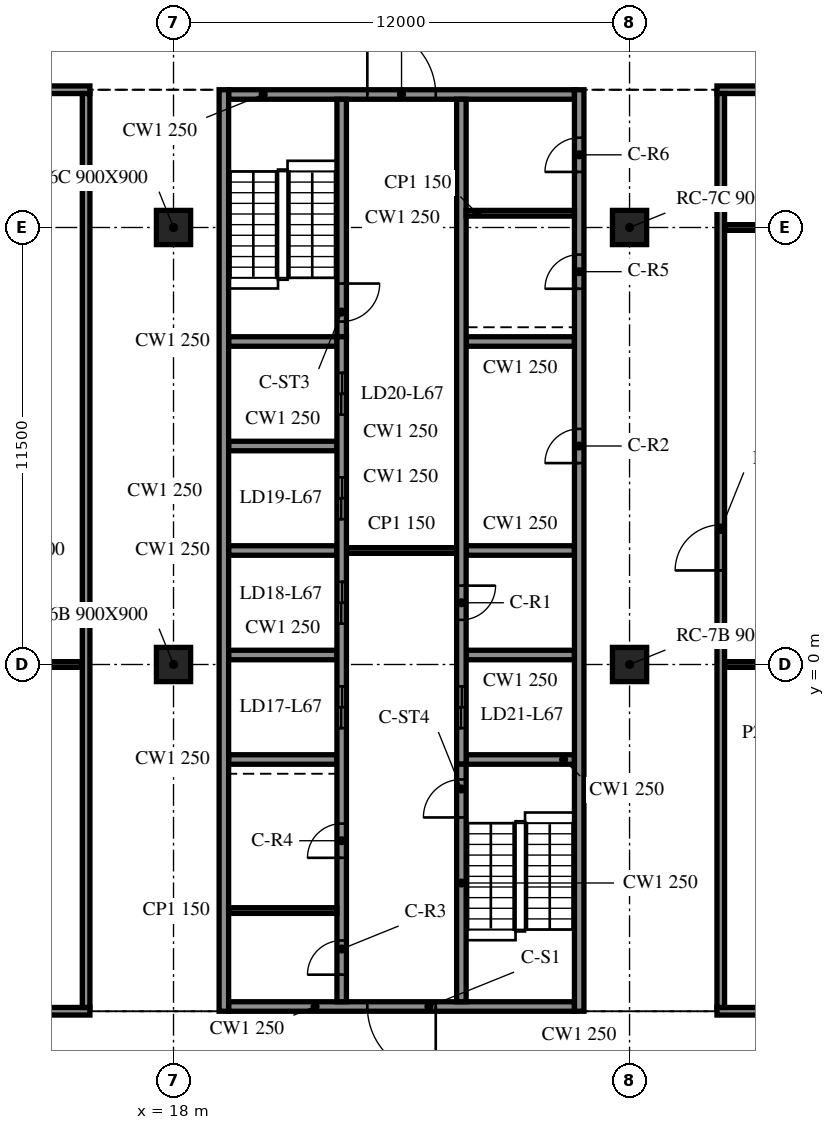
"""IFC4 building model, lengths in metres.
Left out: names, types, materials, properties, quantities, classifications, styles, units other than length and angle.
Written with IfcOpenShell. Run it as: python <this file> out.ifc"""

import sys

from ifc_helpers import new_model, si_unit, direction, frame, frame_2d, origin, origin_2d, place, context, subcontext, project, spatial, rectangle, extrude, element, fill, save


model = new_model("IFC4")
c1 = context("Model", 3, precision=1e-05, world=origin(), true_north=direction((0.0, 1.0)))
c2 = subcontext(c1, "Body", "Model", "MODEL_VIEW")
j1 = project(units=[si_unit("LENGTHUNIT", "METRE"), si_unit("PLANEANGLEUNIT", "RADIAN")], contexts=[c1])
p1 = place(None, origin())
s1 = spatial("IfcSite", under=j1, at=p1, CompositionType="ELEMENT")
p2 = place(p1, origin())
s2 = spatial("IfcBuilding", under=s1, at=p2, CompositionType="ELEMENT")
p3 = place(p2, frame((0.0, 0.0, 274.7)))
s3 = spatial("IfcBuildingStorey", under=s2, at=p3, CompositionType="ELEMENT", Elevation=274.7)
for number, where, z_axis, x_axis in (
    (1, (18.0, 0.0, -0.34), (0.0, 0.0, 1.0), (1.0, 0.0, 0.0)),
    (2, (18.0, 11.5, -0.34), (0.0, 0.0, 1.0), (1.0, 0.0, 0.0)),
    (3, (30.0, 0.0, -0.34), (0.0, 0.0, 1.0), (1.0, 0.0, 0.0)),
    (4, (30.0, 11.5, -0.34), (0.0, 0.0, 1.0), (1.0, 0.0, 0.0)),
):
    element("IfcColumn", number, at=place(p3, frame(where, z_axis=z_axis, x_axis=x_axis)), inside=s3, PredefinedType="COLUMN", context=c2, shape_type="SweptSolid", body=[
        extrude(rectangle(XDim=0.9, YDim=0.9, at=origin_2d()), origin(), (0.0, 0.0, 1.0), 3.8),
    ])
p4 = place(p3, frame((19.325, 15.125, 0.0), z_axis=(0.0, 0.0, 1.0), x_axis=(0.0, -1.0, 0.0)))
e5 = element("IfcWall", 5, at=p4, inside=s3, PredefinedType="SOLIDWALL", context=c2, shape_type="SweptSolid", body=[
    extrude(rectangle(XDim=24.25, YDim=0.25, at=frame_2d((12.125, 0.0))), origin(), (0.0, 0.0, 1.0), 3.46),
])
p5 = place(p3, frame((28.675, -9.125, 0.0), z_axis=(0.0, 0.0, 1.0), x_axis=(0.0, 1.0, 0.0)))
e6 = element("IfcWall", 6, at=p5, inside=s3, PredefinedType="SOLIDWALL", context=c2, shape_type="SweptSolid", body=[
    extrude(rectangle(XDim=24.25, YDim=0.25, at=frame_2d((12.125, 0.0))), origin(), (0.0, 0.0, 1.0), 3.46),
])
p6 = place(p5, frame((14.425, 0.0, 0.0)))
e7 = element("IfcOpeningElement", 7, at=p6, cuts=e6, PredefinedType="OPENING", context=c2, shape_type="SweptSolid", body=[
    extrude(rectangle(XDim=0.9, YDim=2.1, at=frame_2d((0.45, 1.05))), frame((0.0, 0.135, 0.0), z_axis=(0.0, -1.0, 0.0), x_axis=(1.0, 0.0, 0.0)), (0.0, 0.0, 1.0), 0.27),
])
p7 = place(p5, frame((19.012, 0.0, 0.0)))
e8 = element("IfcOpeningElement", 8, at=p7, cuts=e6, PredefinedType="OPENING", context=c2, shape_type="SweptSolid", body=[
    extrude(rectangle(XDim=0.9, YDim=2.1, at=frame_2d((0.45, 1.05))), frame((0.0, 0.135, 0.0), z_axis=(0.0, -1.0, 0.0), x_axis=(1.0, 0.0, 0.0)), (0.0, 0.0, 1.0), 0.27),
])
p8 = place(p5, frame((22.087, 0.0, 0.0)))
e9 = element("IfcOpeningElement", 9, at=p8, cuts=e6, PredefinedType="OPENING", context=c2, shape_type="SweptSolid", body=[
    extrude(rectangle(XDim=0.9, YDim=2.1, at=frame_2d((0.45, 1.05))), frame((0.0, 0.135, 0.0), z_axis=(0.0, -1.0, 0.0), x_axis=(1.0, 0.0, 0.0)), (0.0, 0.0, 1.0), 0.27),
])
p9 = place(p3, frame((28.55, -9.0, 0.0), z_axis=(0.0, 0.0, 1.0), x_axis=(-1.0, 0.0, 0.0)))
e10 = element("IfcWall", 10, at=p9, inside=s3, PredefinedType="SOLIDWALL", context=c2, shape_type="SweptSolid", body=[
    extrude(rectangle(XDim=9.1, YDim=0.25, at=frame_2d((4.55, 0.0))), origin(), (0.0, 0.0, 1.0), 3.46),
])
p10 = place(p9, frame((3.65, 0.0, 0.0)))
e11 = element("IfcOpeningElement", 11, at=p10, cuts=e10, PredefinedType="OPENING", context=c2, shape_type="SweptSolid", body=[
    extrude(rectangle(XDim=1.8, YDim=2.1, at=frame_2d((0.9, 1.05))), frame((0.0, 0.135, 0.0), z_axis=(0.0, -1.0, 0.0), x_axis=(1.0, 0.0, 0.0)), (0.0, 0.0, 1.0), 0.27),
])
p11 = place(p3, frame((19.45, 15.0, 0.0), z_axis=(0.0, 0.0, 1.0), x_axis=(1.0, 0.0, 0.0)))
e12 = element("IfcWall", 12, at=p11, inside=s3, PredefinedType="SOLIDWALL", context=c2, shape_type="SweptSolid", body=[
    extrude(rectangle(XDim=9.1, YDim=0.25, at=frame_2d((4.55, 0.0))), origin(), (0.0, 0.0, 1.0), 3.46),
])
p12 = place(p11, frame((3.65, 0.0, 0.0)))
e13 = element("IfcOpeningElement", 13, at=p12, cuts=e12, PredefinedType="OPENING", context=c2, shape_type="SweptSolid", body=[
    extrude(rectangle(XDim=1.8, YDim=2.1, at=frame_2d((0.9, 1.05))), frame((0.0, 0.135, 0.0), z_axis=(0.0, -1.0, 0.0), x_axis=(1.0, 0.0, 0.0)), (0.0, 0.0, 1.0), 0.27),
])
p13 = place(p3, frame((22.425, -8.875, 0.0), z_axis=(0.0, 0.0, 1.0), x_axis=(0.0, 1.0, 0.0)))
e14 = element("IfcWall", 14, at=p13, inside=s3, PredefinedType="SOLIDWALL", context=c2, shape_type="SweptSolid", body=[
    extrude(rectangle(XDim=17.5, YDim=0.25, at=frame_2d((8.75, 0.0))), origin(), (0.0, 0.0, 1.0), 3.46),
])
p14 = place(p13, frame((7.2, 0.0, 0.0)))
e15 = element("IfcOpeningElement", 15, at=p14, cuts=e14, PredefinedType="OPENING", context=c2, shape_type="SweptSolid", body=[
    extrude(rectangle(XDim=1.1, YDim=2.1, at=frame_2d((0.55, 1.05))), frame((0.0, 0.135, 0.0), z_axis=(0.0, -1.0, 0.0), x_axis=(1.0, 0.0, 0.0)), (0.0, 0.0, 1.0), 0.27),
])
p15 = place(p13, frame((9.95, 0.0, 0.0)))
e16 = element("IfcOpeningElement", 16, at=p15, cuts=e14, PredefinedType="OPENING", context=c2, shape_type="SweptSolid", body=[
    extrude(rectangle(XDim=1.1, YDim=2.1, at=frame_2d((0.55, 1.05))), frame((0.0, 0.135, 0.0), z_axis=(0.0, -1.0, 0.0), x_axis=(1.0, 0.0, 0.0)), (0.0, 0.0, 1.0), 0.27),
])
p16 = place(p13, frame((12.7, 0.0, 0.0)))
e17 = element("IfcOpeningElement", 17, at=p16, cuts=e14, PredefinedType="OPENING", context=c2, shape_type="SweptSolid", body=[
    extrude(rectangle(XDim=1.1, YDim=2.1, at=frame_2d((0.55, 1.05))), frame((0.0, 0.135, 0.0), z_axis=(0.0, -1.0, 0.0), x_axis=(1.0, 0.0, 0.0)), (0.0, 0.0, 1.0), 0.27),
])
p17 = place(p13, frame((15.45, 0.0, 0.0)))
e18 = element("IfcOpeningElement", 18, at=p17, cuts=e14, PredefinedType="OPENING", context=c2, shape_type="SweptSolid", body=[
    extrude(rectangle(XDim=1.1, YDim=2.1, at=frame_2d((0.55, 1.05))), frame((0.0, 0.135, 0.0), z_axis=(0.0, -1.0, 0.0), x_axis=(1.0, 0.0, 0.0)), (0.0, 0.0, 1.0), 0.27),
])
p18 = place(p13, frame((0.712, 0.0, 0.0)))
e19 = element("IfcOpeningElement", 19, at=p18, cuts=e14, PredefinedType="OPENING", context=c2, shape_type="SweptSolid", body=[
    extrude(rectangle(XDim=0.9, YDim=2.1, at=frame_2d((0.45, 1.05))), frame((0.0, 0.135, 0.0), z_axis=(0.0, -1.0, 0.0), x_axis=(1.0, 0.0, 0.0)), (0.0, 0.0, 1.0), 0.27),
])
p19 = place(p13, frame((3.788, 0.0, 0.0)))
e20 = element("IfcOpeningElement", 20, at=p19, cuts=e14, PredefinedType="OPENING", context=c2, shape_type="SweptSolid", body=[
    extrude(rectangle(XDim=0.9, YDim=2.1, at=frame_2d((0.45, 1.05))), frame((0.0, 0.135, 0.0), z_axis=(0.0, -1.0, 0.0), x_axis=(1.0, 0.0, 0.0)), (0.0, 0.0, 1.0), 0.27),
])
p20 = place(p3, frame((22.425, 14.875, 0.0), z_axis=(0.0, 0.0, 1.0), x_axis=(0.0, -1.0, 0.0)))
e21 = element("IfcWall", 21, at=p20, inside=s3, PredefinedType="SOLIDWALL", context=c2, shape_type="SweptSolid", body=[
    extrude(rectangle(XDim=6.25, YDim=0.25, at=frame_2d((3.125, 0.0))), origin(), (0.0, 0.0, 1.0), 3.46),
])
p21 = place(p20, frame((4.85, 0.0, 0.0)))
e22 = element("IfcOpeningElement", 22, at=p21, cuts=e21, PredefinedType="OPENING", context=c2, shape_type="SweptSolid", body=[
    extrude(rectangle(XDim=1.0, YDim=2.1, at=frame_2d((0.5, 1.05))), frame((0.0, 0.135, 0.0), z_axis=(0.0, -1.0, 0.0), x_axis=(1.0, 0.0, 0.0)), (0.0, 0.0, 1.0), 0.27),
])
p22 = place(p3, frame((25.575, -8.875, 0.0), z_axis=(0.0, 0.0, 1.0), x_axis=(0.0, 1.0, 0.0)))
e23 = element("IfcWall", 23, at=p22, inside=s3, PredefinedType="SOLIDWALL", context=c2, shape_type="SweptSolid", body=[
    extrude(rectangle(XDim=6.25, YDim=0.25, at=frame_2d((3.125, 0.0))), origin(), (0.0, 0.0, 1.0), 3.46),
])
p23 = place(p22, frame((4.85, 0.0, 0.0)))
e24 = element("IfcOpeningElement", 24, at=p23, cuts=e23, PredefinedType="OPENING", context=c2, shape_type="SweptSolid", body=[
    extrude(rectangle(XDim=1.0, YDim=2.1, at=frame_2d((0.5, 1.05))), frame((0.0, 0.135, 0.0), z_axis=(0.0, -1.0, 0.0), x_axis=(1.0, 0.0, 0.0)), (0.0, 0.0, 1.0), 0.27),
])
p24 = place(p3, frame((25.575, 14.875, 0.0), z_axis=(0.0, 0.0, 1.0), x_axis=(0.0, -1.0, 0.0)))
e25 = element("IfcWall", 25, at=p24, inside=s3, PredefinedType="SOLIDWALL", context=c2, shape_type="SweptSolid", body=[
    extrude(rectangle(XDim=17.5, YDim=0.25, at=frame_2d((8.75, 0.0))), origin(), (0.0, 0.0, 1.0), 3.46),
])
p25 = place(p24, frame((15.45, 0.0, 0.0)))
e26 = element("IfcOpeningElement", 26, at=p25, cuts=e25, PredefinedType="OPENING", context=c2, shape_type="SweptSolid", body=[
    extrude(rectangle(XDim=1.1, YDim=2.1, at=frame_2d((0.55, 1.05))), frame((0.0, 0.135, 0.0), z_axis=(0.0, -1.0, 0.0), x_axis=(1.0, 0.0, 0.0)), (0.0, 0.0, 1.0), 0.27),
])
p26 = place(p24, frame((12.8, 0.0, 0.0)))
e27 = element("IfcOpeningElement", 27, at=p26, cuts=e25, PredefinedType="OPENING", context=c2, shape_type="SweptSolid", body=[
    extrude(rectangle(XDim=0.9, YDim=2.1, at=frame_2d((0.45, 1.05))), frame((0.0, 0.135, 0.0), z_axis=(0.0, -1.0, 0.0), x_axis=(1.0, 0.0, 0.0)), (0.0, 0.0, 1.0), 0.27),
])
for number, where, z_axis, x_axis in (
    (28, (19.45, -2.5, 0.0), (0.0, 0.0, 1.0), (1.0, 0.0, 0.0)),
    (29, (19.45, 0.25, 0.0), (0.0, 0.0, 1.0), (1.0, 0.0, 0.0)),
    (30, (19.45, 3.0, 0.0), (0.0, 0.0, 1.0), (1.0, 0.0, 0.0)),
    (31, (19.45, 5.75, 0.0), (0.0, 0.0, 1.0), (1.0, 0.0, 0.0)),
    (32, (19.45, 8.5, 0.0), (0.0, 0.0, 1.0), (1.0, 0.0, 0.0)),
    (33, (25.7, -2.5, 0.0), (0.0, 0.0, 1.0), (1.0, 0.0, 0.0)),
    (34, (25.7, 0.25, 0.0), (0.0, 0.0, 1.0), (1.0, 0.0, 0.0)),
    (35, (25.7, 3.0, 0.0), (0.0, 0.0, 1.0), (1.0, 0.0, 0.0)),
    (36, (25.7, 8.5, 0.0), (0.0, 0.0, 1.0), (1.0, 0.0, 0.0)),
):
    element("IfcWall", number, at=place(p3, frame(where, z_axis=z_axis, x_axis=x_axis)), inside=s3, PredefinedType="SOLIDWALL", context=c2, shape_type="SweptSolid", body=[
        extrude(rectangle(XDim=2.85, YDim=0.25, at=frame_2d((1.425, 0.0))), origin(), (0.0, 0.0, 1.0), 3.46),
    ])
p27 = place(p3, frame((22.55, 3.0, 0.0), z_axis=(0.0, 0.0, 1.0), x_axis=(1.0, 0.0, 0.0)))
e37 = element("IfcWall", 37, at=p27, inside=s3, PredefinedType="PARTITIONING", context=c2, shape_type="SweptSolid", body=[
    extrude(rectangle(XDim=2.9, YDim=0.15, at=frame_2d((1.45, 0.0))), origin(), (0.0, 0.0, 1.0), 3.46),
])
for number, where, z_axis, x_axis in (
    (38, (19.45, -6.475, 0.0), (0.0, 0.0, 1.0), (1.0, 0.0, 0.0)),
    (39, (25.7, 11.875, 0.0), (0.0, 0.0, 1.0), (1.0, 0.0, 0.0)),
):
    element("IfcWall", number, at=place(p3, frame(where, z_axis=z_axis, x_axis=x_axis)), inside=s3, PredefinedType="PARTITIONING", context=c2, shape_type="SweptSolid", body=[
        extrude(rectangle(XDim=2.85, YDim=0.15, at=frame_2d((1.425, 0.0))), origin(), (0.0, 0.0, 1.0), 3.46),
    ])
p28 = place(p3, frame((8.1, -9.125, 0.0), z_axis=(0.0, 0.0, 1.0), x_axis=(1.0, 0.0, 0.0)))
e40 = element("IfcWall", 40, at=p28, inside=s3, PredefinedType="PARTITIONING", context=c2, shape_type="SweptSolid", body=[
    extrude(rectangle(XDim=7.7, YDim=0.2, at=frame_2d((3.85, 0.0))), origin(), (0.0, 0.0, 1.0), 3.46),
])
p29 = place(p28, frame((3.3, 0.0, 0.0)))
e41 = element("IfcOpeningElement", 41, at=p29, cuts=e40, PredefinedType="OPENING", context=c2, shape_type="SweptSolid", body=[
    extrude(rectangle(XDim=0.9, YDim=2.1, at=frame_2d((0.45, 1.05))), frame((0.0, 0.11, 0.0), z_axis=(0.0, -1.0, 0.0), x_axis=(1.0, 0.0, 0.0)), (0.0, 0.0, 1.0), 0.22),
])
p30 = place(p3, frame((32.3, -9.125, 0.0), z_axis=(0.0, 0.0, 1.0), x_axis=(1.0, 0.0, 0.0)))
e42 = element("IfcWall", 42, at=p30, inside=s3, PredefinedType="PARTITIONING", context=c2, shape_type="SweptSolid", body=[
    extrude(rectangle(XDim=15.13, YDim=0.2, at=frame_2d((7.565, 0.0))), origin(), (0.0, 0.0, 1.0), 3.46),
])
p31 = place(p30, frame((6.9, 0.0, 0.0)))
e43 = element("IfcOpeningElement", 43, at=p31, cuts=e42, PredefinedType="OPENING", context=c2, shape_type="SweptSolid", body=[
    extrude(rectangle(XDim=1.2, YDim=2.1, at=frame_2d((0.6, 1.05))), frame((0.0, 0.11, 0.0), z_axis=(0.0, -1.0, 0.0), x_axis=(1.0, 0.0, 0.0)), (0.0, 0.0, 1.0), 0.22),
])
p32 = place(p3, frame((8.3, 0.0, 0.0), z_axis=(0.0, 0.0, 1.0), x_axis=(1.0, 0.0, 0.0)))
e44 = element("IfcWall", 44, at=p32, inside=s3, PredefinedType="PARTITIONING", context=c2, shape_type="SweptSolid", body=[
    extrude(rectangle(XDim=7.3, YDim=0.15, at=frame_2d((3.65, 0.0))), origin(), (0.0, 0.0, 1.0), 3.46),
])
for number, where, z_axis, x_axis in (
    (45, (32.5, 0.0, 0.0), (0.0, 0.0, 1.0), (1.0, 0.0, 0.0)),
    (46, (32.5, 11.5, 0.0), (0.0, 0.0, 1.0), (1.0, 0.0, 0.0)),
):
    element("IfcWall", number, at=place(p3, frame(where, z_axis=z_axis, x_axis=x_axis)), inside=s3, PredefinedType="PARTITIONING", context=c2, shape_type="SweptSolid", body=[
        extrude(rectangle(XDim=9.05, YDim=0.15, at=frame_2d((4.525, 0.0))), origin(), (0.0, 0.0, 1.0), 3.46),
    ])
p33 = place(p3, frame((8.1, 15.125, 0.0), z_axis=(0.0, 0.0, 1.0), x_axis=(1.0, 0.0, 0.0)))
e47 = element("IfcWall", 47, at=p33, inside=s3, PredefinedType="PARTITIONING", context=c2, shape_type="SweptSolid", body=[
    extrude(rectangle(XDim=7.7, YDim=0.2, at=frame_2d((3.85, 0.0))), origin(), (0.0, 0.0, 1.0), 3.46),
])
p34 = place(p3, frame((32.3, 15.125, 0.0), z_axis=(0.0, 0.0, 1.0), x_axis=(1.0, 0.0, 0.0)))
e48 = element("IfcWall", 48, at=p34, inside=s3, PredefinedType="PARTITIONING", context=c2, shape_type="SweptSolid", body=[
    extrude(rectangle(XDim=15.675, YDim=0.2, at=frame_2d((7.837, 0.0))), origin(), (0.0, 0.0, 1.0), 3.46),
])
p35 = place(p34, frame((7.3, 0.0, 0.0)))
e49 = element("IfcOpeningElement", 49, at=p35, cuts=e48, PredefinedType="OPENING", context=c2, shape_type="SweptSolid", body=[
    extrude(rectangle(XDim=1.0, YDim=2.1, at=frame_2d((0.5, 1.05))), frame((0.0, 0.11, 0.0), z_axis=(0.0, -1.0, 0.0), x_axis=(1.0, 0.0, 0.0)), (0.0, 0.0, 1.0), 0.22),
])
p36 = place(p3, frame((15.7, -9.025, 0.0), z_axis=(0.0, 0.0, 1.0), x_axis=(0.0, 1.0, 0.0)))
e50 = element("IfcWall", 50, at=p36, inside=s3, PredefinedType="PARTITIONING", context=c2, shape_type="SweptSolid", body=[
    extrude(rectangle(XDim=24.05, YDim=0.2, at=frame_2d((12.025, 0.0))), origin(), (0.0, 0.0, 1.0), 3.46),
])
p37 = place(p3, frame((32.4, -9.025, 0.0), z_axis=(0.0, 0.0, 1.0), x_axis=(0.0, 1.0, 0.0)))
e51 = element("IfcWall", 51, at=p37, inside=s3, PredefinedType="PARTITIONING", context=c2, shape_type="SweptSolid", body=[
    extrude(rectangle(XDim=24.05, YDim=0.2, at=frame_2d((12.025, 0.0))), origin(), (0.0, 0.0, 1.0), 3.46),
])
p38 = place(p37, frame((11.5, 0.0, 0.0)))
e52 = element("IfcOpeningElement", 52, at=p38, cuts=e51, PredefinedType="OPENING", context=c2, shape_type="SweptSolid", body=[
    extrude(rectangle(XDim=1.2, YDim=2.1, at=frame_2d((0.6, 1.05))), frame((0.0, 0.11, 0.0), z_axis=(0.0, -1.0, 0.0), x_axis=(1.0, 0.0, 0.0)), (0.0, 0.0, 1.0), 0.22),
])
p39 = place(p10, origin())
e53 = element("IfcDoor", 53, at=p39, inside=s3, OperationType="DOUBLE_DOOR_SINGLE_SWING", PredefinedType="DOOR", context=c2, shape_type="SweptSolid", body=[
    extrude(rectangle(XDim=1.8, YDim=2.1, at=frame_2d((0.9, 1.05))), frame((0.0, 0.025, 0.0), z_axis=(0.0, -1.0, 0.0), x_axis=(1.0, 0.0, 0.0)), (0.0, 0.0, 1.0), 0.05),
])
fill(e11, e53)
p40 = place(p12, origin())
e54 = element("IfcDoor", 54, at=p40, inside=s3, OperationType="DOUBLE_DOOR_SINGLE_SWING", PredefinedType="DOOR", context=c2, shape_type="SweptSolid", body=[
    extrude(rectangle(XDim=1.8, YDim=2.1, at=frame_2d((0.9, 1.05))), frame((0.0, 0.025, 0.0), z_axis=(0.0, -1.0, 0.0), x_axis=(1.0, 0.0, 0.0)), (0.0, 0.0, 1.0), 0.05),
])
fill(e13, e54)
p41 = place(p25, origin())
e55 = element("IfcDoor", 55, at=p41, inside=s3, OperationType="DOUBLE_DOOR_SLIDING", PredefinedType="DOOR", context=c2, shape_type="SweptSolid", body=[
    extrude(rectangle(XDim=1.1, YDim=2.1, at=frame_2d((0.55, 1.05))), frame((0.0, 0.025, 0.0), z_axis=(0.0, -1.0, 0.0), x_axis=(1.0, 0.0, 0.0)), (0.0, 0.0, 1.0), 0.05),
])
fill(e26, e55)
p42 = place(p14, origin())
e56 = element("IfcDoor", 56, at=p42, inside=s3, OperationType="DOUBLE_DOOR_SLIDING", PredefinedType="DOOR", context=c2, shape_type="SweptSolid", body=[
    extrude(rectangle(XDim=1.1, YDim=2.1, at=frame_2d((0.55, 1.05))), frame((0.0, 0.025, 0.0), z_axis=(0.0, -1.0, 0.0), x_axis=(1.0, 0.0, 0.0)), (0.0, 0.0, 1.0), 0.05),
])
fill(e15, e56)
p43 = place(p15, origin())
e57 = element("IfcDoor", 57, at=p43, inside=s3, OperationType="DOUBLE_DOOR_SLIDING", PredefinedType="DOOR", context=c2, shape_type="SweptSolid", body=[
    extrude(rectangle(XDim=1.1, YDim=2.1, at=frame_2d((0.55, 1.05))), frame((0.0, 0.025, 0.0), z_axis=(0.0, -1.0, 0.0), x_axis=(1.0, 0.0, 0.0)), (0.0, 0.0, 1.0), 0.05),
])
fill(e16, e57)
p44 = place(p16, origin())
e58 = element("IfcDoor", 58, at=p44, inside=s3, OperationType="DOUBLE_DOOR_SLIDING", PredefinedType="DOOR", context=c2, shape_type="SweptSolid", body=[
    extrude(rectangle(XDim=1.1, YDim=2.1, at=frame_2d((0.55, 1.05))), frame((0.0, 0.025, 0.0), z_axis=(0.0, -1.0, 0.0), x_axis=(1.0, 0.0, 0.0)), (0.0, 0.0, 1.0), 0.05),
])
fill(e17, e58)
p45 = place(p17, origin())
e59 = element("IfcDoor", 59, at=p45, inside=s3, OperationType="DOUBLE_DOOR_SLIDING", PredefinedType="DOOR", context=c2, shape_type="SweptSolid", body=[
    extrude(rectangle(XDim=1.1, YDim=2.1, at=frame_2d((0.55, 1.05))), frame((0.0, 0.025, 0.0), z_axis=(0.0, -1.0, 0.0), x_axis=(1.0, 0.0, 0.0)), (0.0, 0.0, 1.0), 0.05),
])
fill(e18, e59)
p46 = place(p26, origin())
e60 = element("IfcDoor", 60, at=p46, inside=s3, OperationType="SINGLE_SWING_LEFT", PredefinedType="DOOR", context=c2, shape_type="SweptSolid", body=[
    extrude(rectangle(XDim=0.9, YDim=2.1, at=frame_2d((0.45, 1.05))), frame((0.0, 0.025, 0.0), z_axis=(0.0, -1.0, 0.0), x_axis=(1.0, 0.0, 0.0)), (0.0, 0.0, 1.0), 0.05),
])
fill(e27, e60)
p47 = place(p6, origin())
e61 = element("IfcDoor", 61, at=p47, inside=s3, OperationType="SINGLE_SWING_RIGHT", PredefinedType="DOOR", context=c2, shape_type="SweptSolid", body=[
    extrude(rectangle(XDim=0.9, YDim=2.1, at=frame_2d((0.45, 1.05))), frame((0.0, 0.025, 0.0), z_axis=(0.0, -1.0, 0.0), x_axis=(1.0, 0.0, 0.0)), (0.0, 0.0, 1.0), 0.05),
])
fill(e7, e61)
p48 = place(p18, origin())
e62 = element("IfcDoor", 62, at=p48, inside=s3, OperationType="SINGLE_SWING_LEFT", PredefinedType="DOOR", context=c2, shape_type="SweptSolid", body=[
    extrude(rectangle(XDim=0.9, YDim=2.1, at=frame_2d((0.45, 1.05))), frame((0.0, 0.025, 0.0), z_axis=(0.0, -1.0, 0.0), x_axis=(1.0, 0.0, 0.0)), (0.0, 0.0, 1.0), 0.05),
])
fill(e19, e62)
p49 = place(p19, origin())
e63 = element("IfcDoor", 63, at=p49, inside=s3, OperationType="SINGLE_SWING_RIGHT", PredefinedType="DOOR", context=c2, shape_type="SweptSolid", body=[
    extrude(rectangle(XDim=0.9, YDim=2.1, at=frame_2d((0.45, 1.05))), frame((0.0, 0.025, 0.0), z_axis=(0.0, -1.0, 0.0), x_axis=(1.0, 0.0, 0.0)), (0.0, 0.0, 1.0), 0.05),
])
fill(e20, e63)
p50 = place(p7, origin())
e64 = element("IfcDoor", 64, at=p50, inside=s3, OperationType="SINGLE_SWING_LEFT", PredefinedType="DOOR", context=c2, shape_type="SweptSolid", body=[
    extrude(rectangle(XDim=0.9, YDim=2.1, at=frame_2d((0.45, 1.05))), frame((0.0, 0.025, 0.0), z_axis=(0.0, -1.0, 0.0), x_axis=(1.0, 0.0, 0.0)), (0.0, 0.0, 1.0), 0.05),
])
fill(e8, e64)
p51 = place(p8, origin())
e65 = element("IfcDoor", 65, at=p51, inside=s3, OperationType="SINGLE_SWING_RIGHT", PredefinedType="DOOR", context=c2, shape_type="SweptSolid", body=[
    extrude(rectangle(XDim=0.9, YDim=2.1, at=frame_2d((0.45, 1.05))), frame((0.0, 0.025, 0.0), z_axis=(0.0, -1.0, 0.0), x_axis=(1.0, 0.0, 0.0)), (0.0, 0.0, 1.0), 0.05),
])
fill(e9, e65)
p52 = place(p21, origin())
e66 = element("IfcDoor", 66, at=p52, inside=s3, OperationType="SINGLE_SWING_LEFT", PredefinedType="DOOR", context=c2, shape_type="SweptSolid", body=[
    extrude(rectangle(XDim=1.0, YDim=2.1, at=frame_2d((0.5, 1.05))), frame((0.0, 0.025, 0.0), z_axis=(0.0, -1.0, 0.0), x_axis=(1.0, 0.0, 0.0)), (0.0, 0.0, 1.0), 0.05),
])
fill(e22, e66)
p53 = place(p23, origin())
e67 = element("IfcDoor", 67, at=p53, inside=s3, OperationType="SINGLE_SWING_RIGHT", PredefinedType="DOOR", context=c2, shape_type="SweptSolid", body=[
    extrude(rectangle(XDim=1.0, YDim=2.1, at=frame_2d((0.5, 1.05))), frame((0.0, 0.025, 0.0), z_axis=(0.0, -1.0, 0.0), x_axis=(1.0, 0.0, 0.0)), (0.0, 0.0, 1.0), 0.05),
])
fill(e24, e67)
p54 = place(p38, origin())
e68 = element("IfcDoor", 68, at=p54, inside=s3, OperationType="SINGLE_SWING_LEFT", PredefinedType="DOOR", context=c2, shape_type="SweptSolid", body=[
    extrude(rectangle(XDim=1.2, YDim=2.1, at=frame_2d((0.6, 1.05))), frame((0.0, 0.025, 0.0), z_axis=(0.0, -1.0, 0.0), x_axis=(1.0, 0.0, 0.0)), (0.0, 0.0, 1.0), 0.05),
])
fill(e52, e68)
save(model, sys.argv[1])
